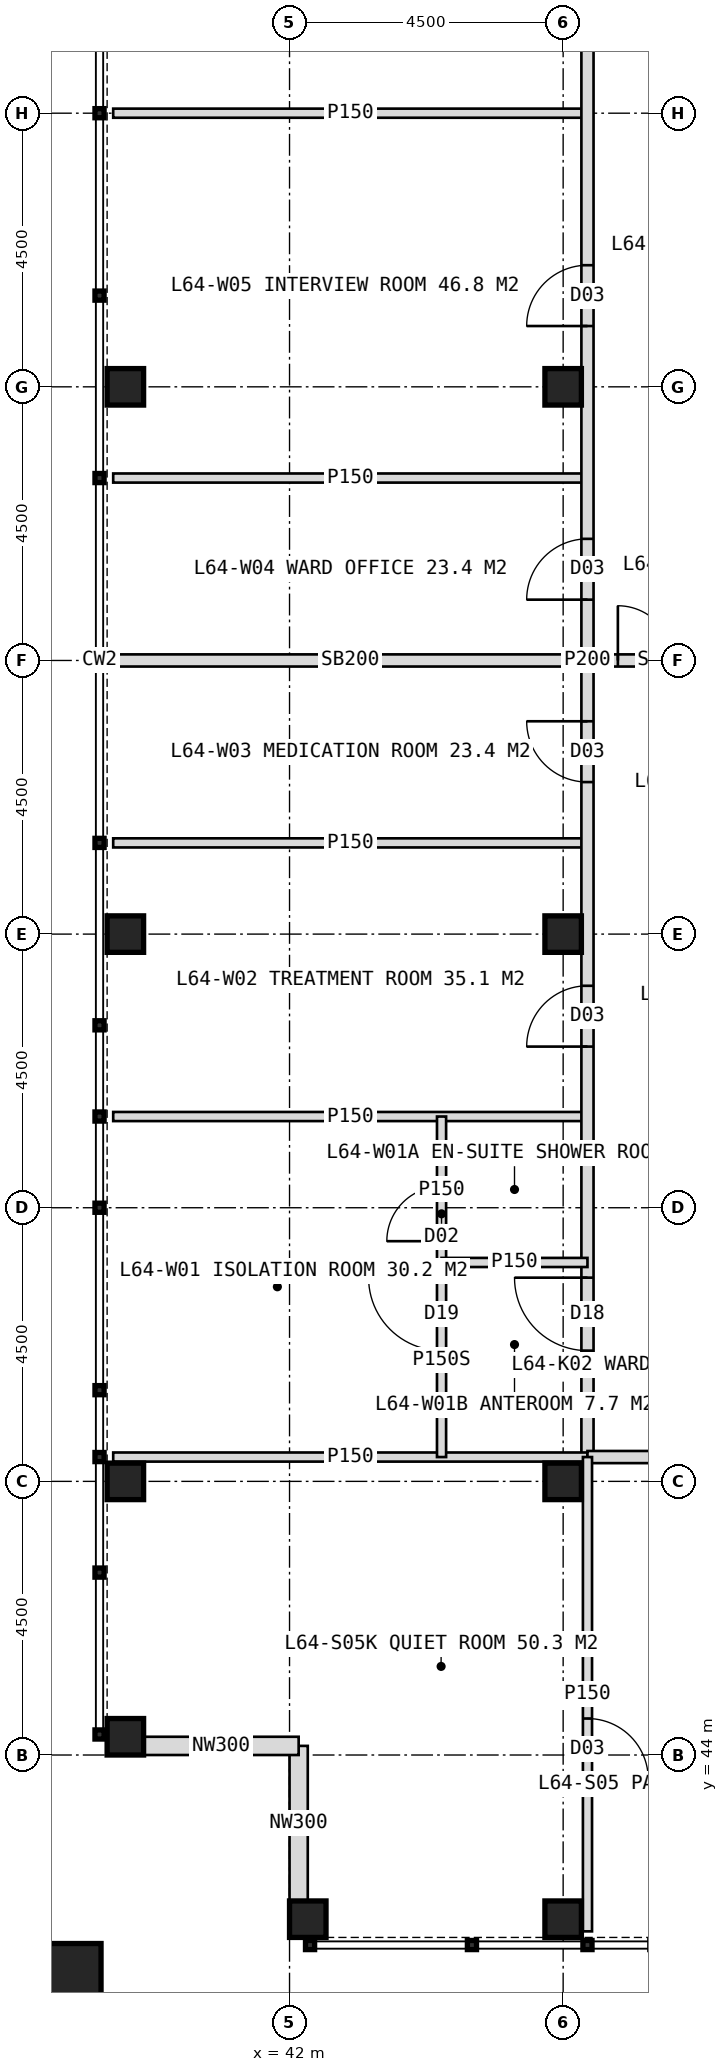
"""IFC4 building model, lengths in metres.
Left out: names, types, materials, properties, quantities, classifications, styles, units other than length and angle.
Written with IfcOpenShell. Run it as: python <this file> out.ifc"""

import sys

from ifc_helpers import new_model, si_unit, direction, frame, frame_2d, origin, origin_2d, place, context, subcontext, project, spatial, rectangle, hollow_rectangle, extrude, element, fill, save


model = new_model("IFC4")
c1 = context("Model", 3, precision=1e-05, world=origin(), true_north=direction((0.0, 1.0)))
c2 = subcontext(c1, "Body", "Model", "MODEL_VIEW")
j1 = project(units=[si_unit("LENGTHUNIT", "METRE"), si_unit("PLANEANGLEUNIT", "RADIAN")], contexts=[c1])
p1 = place(None, origin())
s1 = spatial("IfcSite", under=j1, at=p1, CompositionType="ELEMENT")
p2 = place(p1, origin())
s2 = spatial("IfcBuilding", under=s1, at=p2, CompositionType="ELEMENT")
p3 = place(p2, frame((0.0, 0.0, 266.0)))
s3 = spatial("IfcBuildingStorey", under=s2, at=p3, CompositionType="ELEMENT", Elevation=266.0)
for number, where, z_axis, x_axis in (
    (1, (46.5, 48.5, 0.0), (0.0, 0.0, 1.0), (1.0, 0.0, 0.0)),
    (2, (46.5, 57.5, 0.0), (0.0, 0.0, 1.0), (1.0, 0.0, 0.0)),
    (3, (46.5, 66.5, 0.0), (0.0, 0.0, 1.0), (1.0, 0.0, 0.0)),
    (4, (42.3, 41.3, 0.0), (0.0, 0.0, 1.0), (1.0, 0.0, 0.0)),
    (5, (39.3, 44.3, 0.0), (0.0, 0.0, 1.0), (1.0, 0.0, 0.0)),
    (6, (46.5, 41.3, 0.0), (0.0, 0.0, 1.0), (1.0, 0.0, 0.0)),
    (7, (39.3, 48.5, 0.0), (0.0, 0.0, 1.0), (1.0, 0.0, 0.0)),
    (8, (39.3, 57.5, 0.0), (0.0, 0.0, 1.0), (1.0, 0.0, 0.0)),
    (9, (39.3, 66.5, 0.0), (0.0, 0.0, 1.0), (1.0, 0.0, 0.0)),
):
    element("IfcColumn", number, at=place(p3, frame(where, z_axis=z_axis, x_axis=x_axis)), inside=s3, PredefinedType="COLUMN", context=c2, shape_type="SweptSolid", body=[
        extrude(hollow_rectangle(XDim=0.6, YDim=0.6, WallThickness=0.04, at=origin_2d()), origin(), (0.0, 0.0, 1.0), 4.0),
    ])
p4 = place(p3, frame((38.4, 40.4, 0.0), z_axis=(0.0, 0.0, 1.0), x_axis=(1.0, 0.0, 0.0)))
e10 = element("IfcColumn", 10, at=p4, inside=s3, PredefinedType="COLUMN", context=c2, shape_type="SweptSolid", body=[
    extrude(hollow_rectangle(XDim=1.0, YDim=1.0, WallThickness=0.06, at=origin_2d()), origin(), (0.0, 0.0, 1.0), 4.0),
])
for number, where, z_axis, x_axis in (
    (11, (42.15, 41.6, 0.0), (0.0, 0.0, 1.0), (0.0, 1.0, 0.0)),
    (12, (42.15, 44.15, 0.0), (0.0, 0.0, 1.0), (-1.0, 0.0, 0.0)),
):
    element("IfcWall", number, at=place(p3, frame(where, z_axis=z_axis, x_axis=x_axis)), inside=s3, PredefinedType="ELEMENTEDWALL", context=c2, shape_type="SweptSolid", body=[
        extrude(rectangle(XDim=2.55, YDim=0.3, at=frame_2d((1.275, 0.0))), origin(), (0.0, 0.0, 1.0), 2.95),
    ])
for number, where, z_axis, x_axis in (
    (13, (46.9, 54.5, 0.0), (0.0, 0.0, 1.0), (-1.0, 0.0, 0.0)),
    (14, (46.9, 59.0, 0.0), (0.0, 0.0, 1.0), (-1.0, 0.0, 0.0)),
):
    element("IfcWall", number, at=place(p3, frame(where, z_axis=z_axis, x_axis=x_axis)), inside=s3, PredefinedType="PARTITIONING", context=c2, shape_type="SweptSolid", body=[
        extrude(rectangle(XDim=7.8, YDim=0.15, at=frame_2d((3.9, 0.0))), origin(), (0.0, 0.0, 1.0), 3.75),
    ])
p5 = place(p3, frame((46.9, 62.0, 0.0), z_axis=(0.0, 0.0, 1.0), x_axis=(-1.0, 0.0, 0.0)))
e15 = element("IfcWall", 15, at=p5, inside=s3, PredefinedType="SOLIDWALL", context=c2, shape_type="SweptSolid", body=[
    extrude(rectangle(XDim=7.8, YDim=0.2, at=frame_2d((3.9, 0.0))), origin(), (0.0, 0.0, 1.0), 2.75),
])
for number, where, z_axis, x_axis in (
    (16, (46.9, 65.0, 0.0), (0.0, 0.0, 1.0), (-1.0, 0.0, 0.0)),
    (17, (46.9, 71.0, 0.0), (0.0, 0.0, 1.0), (-1.0, 0.0, 0.0)),
):
    element("IfcWall", number, at=place(p3, frame(where, z_axis=z_axis, x_axis=x_axis)), inside=s3, PredefinedType="PARTITIONING", context=c2, shape_type="SweptSolid", body=[
        extrude(rectangle(XDim=7.8, YDim=0.15, at=frame_2d((3.9, 0.0))), origin(), (0.0, 0.0, 1.0), 3.75),
    ])
p6 = place(p3, frame((46.9, 48.9, 0.0), z_axis=(0.0, 0.0, 1.0), x_axis=(0.0, 1.0, 0.0)))
e18 = element("IfcWall", 18, at=p6, inside=s3, PredefinedType="PARTITIONING", context=c2, shape_type="SweptSolid", body=[
    extrude(rectangle(XDim=26.2, YDim=0.2, at=frame_2d((13.1, 0.0))), origin(), (0.0, 0.0, 1.0), 3.75),
])
p7 = place(p6, frame((1.75, 0.0, 0.0)))
e19 = element("IfcOpeningElement", 19, at=p7, cuts=e18, PredefinedType="OPENING", context=c2, shape_type="SweptSolid", body=[
    extrude(rectangle(XDim=1.2, YDim=2.2, at=frame_2d((0.6, 1.1))), frame((0.0, 0.11, 0.0), z_axis=(0.0, -1.0, 0.0), x_axis=(1.0, 0.0, 0.0)), (0.0, 0.0, 1.0), 0.22),
])
p8 = place(p6, frame((6.75, 0.0, 0.0)))
e20 = element("IfcOpeningElement", 20, at=p8, cuts=e18, PredefinedType="OPENING", context=c2, shape_type="SweptSolid", body=[
    extrude(rectangle(XDim=1.0, YDim=2.1, at=frame_2d((0.5, 1.05))), frame((0.0, 0.11, 0.0), z_axis=(0.0, -1.0, 0.0), x_axis=(1.0, 0.0, 0.0)), (0.0, 0.0, 1.0), 0.22),
])
p9 = place(p6, frame((11.1, 0.0, 0.0)))
e21 = element("IfcOpeningElement", 21, at=p9, cuts=e18, PredefinedType="OPENING", context=c2, shape_type="SweptSolid", body=[
    extrude(rectangle(XDim=1.0, YDim=2.1, at=frame_2d((0.5, 1.05))), frame((0.0, 0.11, 0.0), z_axis=(0.0, -1.0, 0.0), x_axis=(1.0, 0.0, 0.0)), (0.0, 0.0, 1.0), 0.22),
])
p10 = place(p6, frame((14.1, 0.0, 0.0)))
e22 = element("IfcOpeningElement", 22, at=p10, cuts=e18, PredefinedType="OPENING", context=c2, shape_type="SweptSolid", body=[
    extrude(rectangle(XDim=1.0, YDim=2.1, at=frame_2d((0.5, 1.05))), frame((0.0, 0.11, 0.0), z_axis=(0.0, -1.0, 0.0), x_axis=(1.0, 0.0, 0.0)), (0.0, 0.0, 1.0), 0.22),
])
p11 = place(p6, frame((18.6, 0.0, 0.0)))
e23 = element("IfcOpeningElement", 23, at=p11, cuts=e18, PredefinedType="OPENING", context=c2, shape_type="SweptSolid", body=[
    extrude(rectangle(XDim=1.0, YDim=2.1, at=frame_2d((0.5, 1.05))), frame((0.0, 0.11, 0.0), z_axis=(0.0, -1.0, 0.0), x_axis=(1.0, 0.0, 0.0)), (0.0, 0.0, 1.0), 0.22),
])
p12 = place(p6, frame((23.65, 0.0, 0.0)))
e24 = element("IfcOpeningElement", 24, at=p12, cuts=e18, PredefinedType="OPENING", context=c2, shape_type="SweptSolid", body=[
    extrude(rectangle(XDim=1.0, YDim=2.1, at=frame_2d((0.5, 1.05))), frame((0.0, 0.11, 0.0), z_axis=(0.0, -1.0, 0.0), x_axis=(1.0, 0.0, 0.0)), (0.0, 0.0, 1.0), 0.22),
])
p13 = place(p3, frame((46.9, 48.9, 0.0), z_axis=(0.0, 0.0, 1.0), x_axis=(-1.0, 0.0, 0.0)))
e25 = element("IfcWall", 25, at=p13, inside=s3, PredefinedType="PARTITIONING", context=c2, shape_type="SweptSolid", body=[
    extrude(rectangle(XDim=7.8, YDim=0.15, at=frame_2d((3.9, 0.0))), origin(), (0.0, 0.0, 1.0), 3.75),
])
p14 = place(p3, frame((44.5, 52.1, 0.0), z_axis=(0.0, 0.0, 1.0), x_axis=(0.0, 1.0, 0.0)))
e26 = element("IfcWall", 26, at=p14, inside=s3, PredefinedType="PARTITIONING", context=c2, shape_type="SweptSolid", body=[
    extrude(rectangle(XDim=2.4, YDim=0.15, at=frame_2d((1.2, 0.0))), origin(), (0.0, 0.0, 1.0), 3.75),
])
p15 = place(p14, frame((0.35, 0.0, 0.0)))
e27 = element("IfcOpeningElement", 27, at=p15, cuts=e26, PredefinedType="OPENING", context=c2, shape_type="SweptSolid", body=[
    extrude(rectangle(XDim=0.9, YDim=2.1, at=frame_2d((0.45, 1.05))), frame((0.0, 0.085, 0.0), z_axis=(0.0, -1.0, 0.0), x_axis=(1.0, 0.0, 0.0)), (0.0, 0.0, 1.0), 0.17),
])
p16 = place(p3, frame((46.9, 52.1, 0.0), z_axis=(0.0, 0.0, 1.0), x_axis=(-1.0, 0.0, 0.0)))
e28 = element("IfcWall", 28, at=p16, inside=s3, PredefinedType="PARTITIONING", context=c2, shape_type="SweptSolid", body=[
    extrude(rectangle(XDim=2.4, YDim=0.15, at=frame_2d((1.2, 0.0))), origin(), (0.0, 0.0, 1.0), 3.75),
])
p17 = place(p3, frame((44.5, 48.9, 0.0), z_axis=(0.0, 0.0, 1.0), x_axis=(0.0, 1.0, 0.0)))
e29 = element("IfcWall", 29, at=p17, inside=s3, PredefinedType="PARTITIONING", context=c2, shape_type="SweptSolid", body=[
    extrude(rectangle(XDim=3.2, YDim=0.15, at=frame_2d((1.6, 0.0))), origin(), (0.0, 0.0, 1.0), 3.75),
])
p18 = place(p17, frame((1.75, 0.0, 0.0)))
e30 = element("IfcOpeningElement", 30, at=p18, cuts=e29, PredefinedType="OPENING", context=c2, shape_type="SweptSolid", body=[
    extrude(rectangle(XDim=1.2, YDim=2.2, at=frame_2d((0.6, 1.1))), frame((0.0, 0.085, 0.0), z_axis=(0.0, -1.0, 0.0), x_axis=(1.0, 0.0, 0.0)), (0.0, 0.0, 1.0), 0.17),
])
p19 = place(p3, frame((73.1, 48.9, 0.0), z_axis=(0.0, 0.0, 1.0), x_axis=(-1.0, 0.0, 0.0)))
e31 = element("IfcWall", 31, at=p19, inside=s3, PredefinedType="PARTITIONING", context=c2, shape_type="SweptSolid", body=[
    extrude(rectangle(XDim=26.2, YDim=0.2, at=frame_2d((13.1, 0.0))), origin(), (0.0, 0.0, 1.0), 3.75),
])
p20 = place(p19, frame((1.75, 0.0, 0.0)))
e32 = element("IfcOpeningElement", 32, at=p20, cuts=e31, PredefinedType="OPENING", context=c2, shape_type="SweptSolid", body=[
    extrude(rectangle(XDim=1.2, YDim=2.2, at=frame_2d((0.6, 1.1))), frame((0.0, 0.11, 0.0), z_axis=(0.0, -1.0, 0.0), x_axis=(1.0, 0.0, 0.0)), (0.0, 0.0, 1.0), 0.22),
])
p21 = place(p19, frame((6.75, 0.0, 0.0)))
e33 = element("IfcOpeningElement", 33, at=p21, cuts=e31, PredefinedType="OPENING", context=c2, shape_type="SweptSolid", body=[
    extrude(rectangle(XDim=1.0, YDim=2.1, at=frame_2d((0.5, 1.05))), frame((0.0, 0.11, 0.0), z_axis=(0.0, -1.0, 0.0), x_axis=(1.0, 0.0, 0.0)), (0.0, 0.0, 1.0), 0.22),
])
p22 = place(p19, frame((14.25, 0.0, 0.0)))
e34 = element("IfcOpeningElement", 34, at=p22, cuts=e31, PredefinedType="OPENING", context=c2, shape_type="SweptSolid", body=[
    extrude(rectangle(XDim=1.2, YDim=2.2, at=frame_2d((0.6, 1.1))), frame((0.0, 0.11, 0.0), z_axis=(0.0, -1.0, 0.0), x_axis=(1.0, 0.0, 0.0)), (0.0, 0.0, 1.0), 0.22),
])
p23 = place(p19, frame((20.45, 0.0, 0.0)))
e35 = element("IfcOpeningElement", 35, at=p23, cuts=e31, PredefinedType="OPENING", context=c2, shape_type="SweptSolid", body=[
    extrude(rectangle(XDim=0.9, YDim=2.1, at=frame_2d((0.45, 1.05))), frame((0.0, 0.11, 0.0), z_axis=(0.0, -1.0, 0.0), x_axis=(1.0, 0.0, 0.0)), (0.0, 0.0, 1.0), 0.22),
])
p24 = place(p19, frame((18.45, 0.0, 0.0)))
e36 = element("IfcOpeningElement", 36, at=p24, cuts=e31, PredefinedType="OPENING", context=c2, shape_type="SweptSolid", body=[
    extrude(rectangle(XDim=1.0, YDim=2.1, at=frame_2d((0.5, 1.05))), frame((0.0, 0.11, 0.0), z_axis=(0.0, -1.0, 0.0), x_axis=(1.0, 0.0, 0.0)), (0.0, 0.0, 1.0), 0.22),
])
p25 = place(p19, frame((23.65, 0.0, 0.0)))
e37 = element("IfcOpeningElement", 37, at=p25, cuts=e31, PredefinedType="OPENING", context=c2, shape_type="SweptSolid", body=[
    extrude(rectangle(XDim=1.0, YDim=2.1, at=frame_2d((0.5, 1.05))), frame((0.0, 0.11, 0.0), z_axis=(0.0, -1.0, 0.0), x_axis=(1.0, 0.0, 0.0)), (0.0, 0.0, 1.0), 0.22),
])
p26 = place(p3, frame((46.9, 48.9, 0.0), z_axis=(0.0, 0.0, 1.0), x_axis=(0.0, -1.0, 0.0)))
e38 = element("IfcWall", 38, at=p26, inside=s3, PredefinedType="PARTITIONING", context=c2, shape_type="SweptSolid", body=[
    extrude(rectangle(XDim=7.8, YDim=0.15, at=frame_2d((3.9, 0.0))), origin(), (0.0, 0.0, 1.0), 3.75),
])
p27 = place(p26, frame((4.3, 0.0, 0.0)))
e39 = element("IfcOpeningElement", 39, at=p27, cuts=e38, PredefinedType="OPENING", context=c2, shape_type="SweptSolid", body=[
    extrude(rectangle(XDim=1.0, YDim=2.1, at=frame_2d((0.5, 1.05))), frame((0.0, 0.085, 0.0), z_axis=(0.0, -1.0, 0.0), x_axis=(1.0, 0.0, 0.0)), (0.0, 0.0, 1.0), 0.17),
])
p28 = place(p3, frame((49.5, 62.0, 0.0), z_axis=(0.0, 0.0, 1.0), x_axis=(-1.0, 0.0, 0.0)))
e40 = element("IfcWall", 40, at=p28, inside=s3, PredefinedType="SOLIDWALL", context=c2, shape_type="SweptSolid", body=[
    extrude(rectangle(XDim=2.6, YDim=0.2, at=frame_2d((1.3, 0.0))), origin(), (0.0, 0.0, 1.0), 2.75),
])
p29 = place(p28, frame((0.3, 0.0, 0.0)))
e41 = element("IfcOpeningElement", 41, at=p29, cuts=e40, PredefinedType="OPENING", context=c2, shape_type="SweptSolid", body=[
    extrude(rectangle(XDim=1.8, YDim=2.2, at=frame_2d((0.9, 1.1))), frame((0.0, 0.11, 0.0), z_axis=(0.0, -1.0, 0.0), x_axis=(1.0, 0.0, 0.0)), (0.0, 0.0, 1.0), 0.22),
])
p30 = place(p18, origin())
e42 = element("IfcDoor", 42, at=p30, inside=s3, OperationType="SINGLE_SWING_RIGHT", PredefinedType="DOOR", context=c2, shape_type="SweptSolid", body=[
    extrude(rectangle(XDim=1.2, YDim=2.2, at=frame_2d((0.6, 1.1))), frame((0.0, 0.025, 0.0), z_axis=(0.0, -1.0, 0.0), x_axis=(1.0, 0.0, 0.0)), (0.0, 0.0, 1.0), 0.05),
])
fill(e30, e42)
p31 = place(p7, origin())
e43 = element("IfcDoor", 43, at=p31, inside=s3, OperationType="SINGLE_SWING_RIGHT", PredefinedType="DOOR", context=c2, shape_type="SweptSolid", body=[
    extrude(rectangle(XDim=1.2, YDim=2.2, at=frame_2d((0.6, 1.1))), frame((0.0, 0.025, 0.0), z_axis=(0.0, -1.0, 0.0), x_axis=(1.0, 0.0, 0.0)), (0.0, 0.0, 1.0), 0.05),
])
fill(e19, e43)
p32 = place(p15, origin())
e44 = element("IfcDoor", 44, at=p32, inside=s3, OperationType="SINGLE_SWING_LEFT", PredefinedType="DOOR", context=c2, shape_type="SweptSolid", body=[
    extrude(rectangle(XDim=0.9, YDim=2.1, at=frame_2d((0.45, 1.05))), frame((0.0, 0.025, 0.0), z_axis=(0.0, -1.0, 0.0), x_axis=(1.0, 0.0, 0.0)), (0.0, 0.0, 1.0), 0.05),
])
fill(e27, e44)
p33 = place(p8, origin())
e45 = element("IfcDoor", 45, at=p33, inside=s3, OperationType="SINGLE_SWING_LEFT", PredefinedType="DOOR", context=c2, shape_type="SweptSolid", body=[
    extrude(rectangle(XDim=1.0, YDim=2.1, at=frame_2d((0.5, 1.05))), frame((0.0, 0.025, 0.0), z_axis=(0.0, -1.0, 0.0), x_axis=(1.0, 0.0, 0.0)), (0.0, 0.0, 1.0), 0.05),
])
fill(e20, e45)
p34 = place(p9, origin())
e46 = element("IfcDoor", 46, at=p34, inside=s3, OperationType="SINGLE_SWING_RIGHT", PredefinedType="DOOR", context=c2, shape_type="SweptSolid", body=[
    extrude(rectangle(XDim=1.0, YDim=2.1, at=frame_2d((0.5, 1.05))), frame((0.0, 0.025, 0.0), z_axis=(0.0, -1.0, 0.0), x_axis=(1.0, 0.0, 0.0)), (0.0, 0.0, 1.0), 0.05),
])
fill(e21, e46)
p35 = place(p10, origin())
e47 = element("IfcDoor", 47, at=p35, inside=s3, OperationType="SINGLE_SWING_LEFT", PredefinedType="DOOR", context=c2, shape_type="SweptSolid", body=[
    extrude(rectangle(XDim=1.0, YDim=2.1, at=frame_2d((0.5, 1.05))), frame((0.0, 0.025, 0.0), z_axis=(0.0, -1.0, 0.0), x_axis=(1.0, 0.0, 0.0)), (0.0, 0.0, 1.0), 0.05),
])
fill(e22, e47)
p36 = place(p11, origin())
e48 = element("IfcDoor", 48, at=p36, inside=s3, OperationType="SINGLE_SWING_LEFT", PredefinedType="DOOR", context=c2, shape_type="SweptSolid", body=[
    extrude(rectangle(XDim=1.0, YDim=2.1, at=frame_2d((0.5, 1.05))), frame((0.0, 0.025, 0.0), z_axis=(0.0, -1.0, 0.0), x_axis=(1.0, 0.0, 0.0)), (0.0, 0.0, 1.0), 0.05),
])
fill(e23, e48)
p37 = place(p27, origin())
e49 = element("IfcDoor", 49, at=p37, inside=s3, OperationType="SINGLE_SWING_RIGHT", PredefinedType="DOOR", context=c2, shape_type="SweptSolid", body=[
    extrude(rectangle(XDim=1.0, YDim=2.1, at=frame_2d((0.5, 1.05))), frame((0.0, 0.025, 0.0), z_axis=(0.0, -1.0, 0.0), x_axis=(1.0, 0.0, 0.0)), (0.0, 0.0, 1.0), 0.05),
])
fill(e39, e49)
p38 = place(p29, origin())
e50 = element("IfcDoor", 50, at=p38, inside=s3, OperationType="DOUBLE_DOOR_DOUBLE_SWING", PredefinedType="DOOR", context=c2, shape_type="SweptSolid", body=[
    extrude(rectangle(XDim=1.8, YDim=2.2, at=frame_2d((0.9, 1.1))), frame((0.0, 0.025, 0.0), z_axis=(0.0, -1.0, 0.0), x_axis=(1.0, 0.0, 0.0)), (0.0, 0.0, 1.0), 0.05),
])
fill(e41, e50)
save(model, sys.argv[1])
